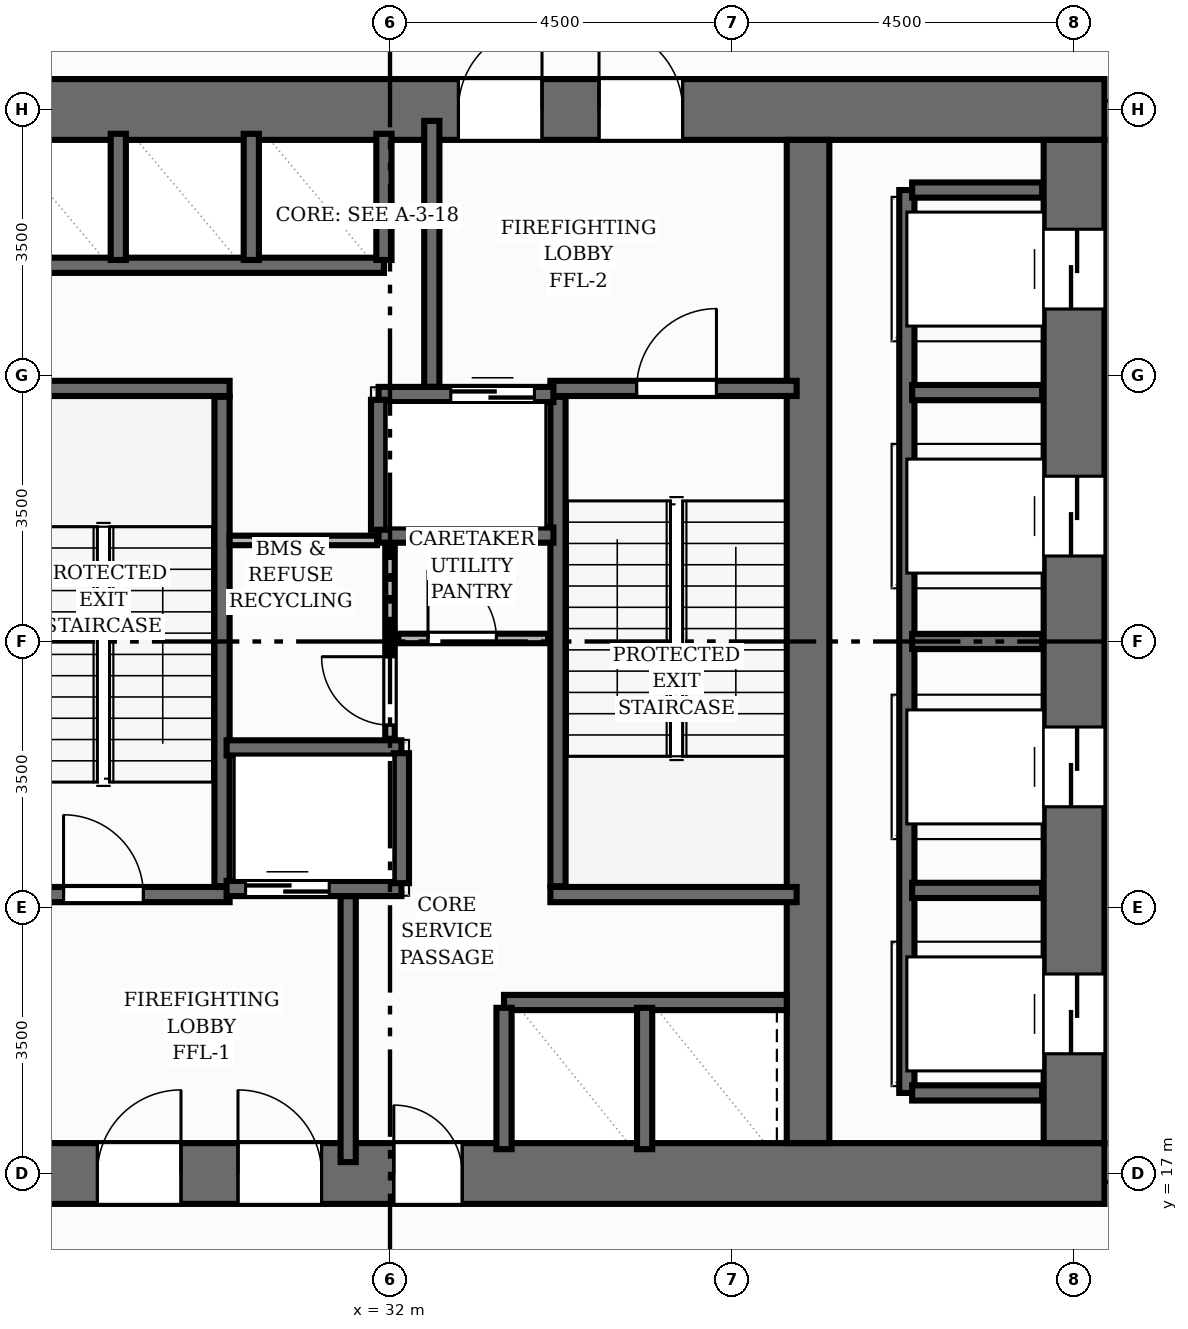
"""IFC4 building model, lengths in metres.
Left out: names, types, materials, properties, quantities, classifications, styles, units other than length and angle.
Written with IfcOpenShell. Run it as: python <this file> out.ifc"""

import sys

from ifc_helpers import new_model, si_unit, direction, frame, frame_2d, origin, place, context, subcontext, project, spatial, rectangle, extrude, element, fill, save


model = new_model("IFC4")
c1 = context("Model", 3, precision=1e-05, world=origin(), true_north=direction((0.0, 1.0)))
c2 = subcontext(c1, "Body", "Model", "MODEL_VIEW")
j1 = project(units=[si_unit("LENGTHUNIT", "METRE"), si_unit("PLANEANGLEUNIT", "RADIAN")], contexts=[c1])
p1 = place(None, origin())
s1 = spatial("IfcSite", under=j1, at=p1, CompositionType="ELEMENT")
p2 = place(p1, origin())
s2 = spatial("IfcBuilding", under=s1, at=p2, CompositionType="ELEMENT")
p3 = place(p2, frame((0.0, 0.0, 66.4)))
s3 = spatial("IfcBuildingStorey", under=s2, at=p3, CompositionType="ELEMENT", Elevation=66.4)
p4 = place(p3, frame((22.6, 17.0, 0.0), z_axis=(0.0, 0.0, 1.0), x_axis=(1.0, 0.0, 0.0)))
e1 = element("IfcWall", 1, at=p4, inside=s3, PredefinedType="SHEAR", context=c2, shape_type="SweptSolid", body=[
    extrude(rectangle(XDim=18.8, YDim=0.8, at=frame_2d((9.4, 0.0))), origin(), (0.0, 0.0, 1.0), 4.48),
])
p5 = place(p4, frame((5.55, 0.0, 0.0)))
e2 = element("IfcOpeningElement", 2, at=p5, cuts=e1, PredefinedType="OPENING", context=c2, shape_type="SweptSolid", body=[
    extrude(rectangle(XDim=1.1, YDim=2.15, at=frame_2d((0.55, 1.075))), frame((0.0, 0.41, 0.0), z_axis=(0.0, -1.0, 0.0), x_axis=(1.0, 0.0, 0.0)), (0.0, 0.0, 1.0), 0.82),
])
p6 = place(p4, frame((7.4, 0.0, 0.0)))
e3 = element("IfcOpeningElement", 3, at=p6, cuts=e1, PredefinedType="OPENING", context=c2, shape_type="SweptSolid", body=[
    extrude(rectangle(XDim=1.1, YDim=2.15, at=frame_2d((0.55, 1.075))), frame((0.0, 0.41, 0.0), z_axis=(0.0, -1.0, 0.0), x_axis=(1.0, 0.0, 0.0)), (0.0, 0.0, 1.0), 0.82),
])
p7 = place(p4, frame((9.45, 0.0, 0.0)))
e4 = element("IfcOpeningElement", 4, at=p7, cuts=e1, PredefinedType="OPENING", context=c2, shape_type="SweptSolid", body=[
    extrude(rectangle(XDim=0.9, YDim=2.1, at=frame_2d((0.45, 1.05))), frame((0.0, 0.41, 0.0), z_axis=(0.0, -1.0, 0.0), x_axis=(1.0, 0.0, 0.0)), (0.0, 0.0, 1.0), 0.82),
])
p8 = place(p3, frame((22.6, 31.0, 0.0), z_axis=(0.0, 0.0, 1.0), x_axis=(1.0, 0.0, 0.0)))
e5 = element("IfcWall", 5, at=p8, inside=s3, PredefinedType="SHEAR", context=c2, shape_type="SweptSolid", body=[
    extrude(rectangle(XDim=18.8, YDim=0.8, at=frame_2d((9.4, 0.0))), origin(), (0.0, 0.0, 1.0), 4.48),
])
p9 = place(p8, frame((10.3, 0.0, 0.0)))
e6 = element("IfcOpeningElement", 6, at=p9, cuts=e5, PredefinedType="OPENING", context=c2, shape_type="SweptSolid", body=[
    extrude(rectangle(XDim=1.1, YDim=2.15, at=frame_2d((0.55, 1.075))), frame((0.0, 0.41, 0.0), z_axis=(0.0, -1.0, 0.0), x_axis=(1.0, 0.0, 0.0)), (0.0, 0.0, 1.0), 0.82),
])
p10 = place(p8, frame((12.15, 0.0, 0.0)))
e7 = element("IfcOpeningElement", 7, at=p10, cuts=e5, PredefinedType="OPENING", context=c2, shape_type="SweptSolid", body=[
    extrude(rectangle(XDim=1.1, YDim=2.15, at=frame_2d((0.55, 1.075))), frame((0.0, 0.41, 0.0), z_axis=(0.0, -1.0, 0.0), x_axis=(1.0, 0.0, 0.0)), (0.0, 0.0, 1.0), 0.82),
])
p11 = place(p3, frame((41.0, 17.4, 0.0), z_axis=(0.0, 0.0, 1.0), x_axis=(0.0, 1.0, 0.0)))
e8 = element("IfcWall", 8, at=p11, inside=s3, PredefinedType="SHEAR", context=c2, shape_type="SweptSolid", body=[
    extrude(rectangle(XDim=13.2, YDim=0.8, at=frame_2d((6.6, 0.0))), origin(), (0.0, 0.0, 1.0), 4.48),
])
p12 = place(p11, frame((1.175, 0.0, 0.0)))
e9 = element("IfcOpeningElement", 9, at=p12, cuts=e8, PredefinedType="OPENING", context=c2, shape_type="SweptSolid", body=[
    extrude(rectangle(XDim=1.05, YDim=2.15, at=frame_2d((0.525, 1.075))), frame((0.0, 0.41, 0.0), z_axis=(0.0, -1.0, 0.0), x_axis=(1.0, 0.0, 0.0)), (0.0, 0.0, 1.0), 0.82),
])
p13 = place(p11, frame((4.425, 0.0, 0.0)))
e10 = element("IfcOpeningElement", 10, at=p13, cuts=e8, PredefinedType="OPENING", context=c2, shape_type="SweptSolid", body=[
    extrude(rectangle(XDim=1.05, YDim=2.15, at=frame_2d((0.525, 1.075))), frame((0.0, 0.41, 0.0), z_axis=(0.0, -1.0, 0.0), x_axis=(1.0, 0.0, 0.0)), (0.0, 0.0, 1.0), 0.82),
])
p14 = place(p11, frame((7.725, 0.0, 0.0)))
e11 = element("IfcOpeningElement", 11, at=p14, cuts=e8, PredefinedType="OPENING", context=c2, shape_type="SweptSolid", body=[
    extrude(rectangle(XDim=1.05, YDim=2.15, at=frame_2d((0.525, 1.075))), frame((0.0, 0.41, 0.0), z_axis=(0.0, -1.0, 0.0), x_axis=(1.0, 0.0, 0.0)), (0.0, 0.0, 1.0), 0.82),
])
p15 = place(p11, frame((10.975, 0.0, 0.0)))
e12 = element("IfcOpeningElement", 12, at=p15, cuts=e8, PredefinedType="OPENING", context=c2, shape_type="SweptSolid", body=[
    extrude(rectangle(XDim=1.05, YDim=2.15, at=frame_2d((0.525, 1.075))), frame((0.0, 0.41, 0.0), z_axis=(0.0, -1.0, 0.0), x_axis=(1.0, 0.0, 0.0)), (0.0, 0.0, 1.0), 0.82),
])
p16 = place(p3, frame((37.5, 17.4, 0.0), z_axis=(0.0, 0.0, 1.0), x_axis=(0.0, 1.0, 0.0)))
e13 = element("IfcWall", 13, at=p16, inside=s3, PredefinedType="SHEAR", context=c2, shape_type="SweptSolid", body=[
    extrude(rectangle(XDim=13.2, YDim=0.56, at=frame_2d((6.6, 0.0))), origin(), (0.0, 0.0, 1.0), 4.48),
])
p17 = place(p3, frame((29.79, 20.78, 0.0), z_axis=(0.0, 0.0, 1.0), x_axis=(0.0, 1.0, 0.0)))
e14 = element("IfcWall", 14, at=p17, inside=s3, PredefinedType="SHEAR", context=c2, shape_type="SweptSolid", body=[
    extrude(rectangle(XDim=6.44, YDim=0.2, at=frame_2d((3.22, 0.0))), origin(), (0.0, 0.0, 1.0), 4.48),
])
p18 = place(p3, frame((26.65, 27.33, 0.0), z_axis=(0.0, 0.0, 1.0), x_axis=(1.0, 0.0, 0.0)))
e15 = element("IfcWall", 15, at=p18, inside=s3, PredefinedType="SHEAR", context=c2, shape_type="SweptSolid", body=[
    extrude(rectangle(XDim=3.24, YDim=0.2, at=frame_2d((1.62, 0.0))), origin(), (0.0, 0.0, 1.0), 4.48),
])
p19 = place(p3, frame((26.65, 20.67, 0.0), z_axis=(0.0, 0.0, 1.0), x_axis=(1.0, 0.0, 0.0)))
e16 = element("IfcWall", 16, at=p19, inside=s3, PredefinedType="SHEAR", context=c2, shape_type="SweptSolid", body=[
    extrude(rectangle(XDim=3.24, YDim=0.2, at=frame_2d((1.62, 0.0))), origin(), (0.0, 0.0, 1.0), 4.48),
])
p20 = place(p19, frame((1.055, 0.0, 0.0)))
e17 = element("IfcOpeningElement", 17, at=p20, cuts=e16, PredefinedType="OPENING", context=c2, shape_type="SweptSolid", body=[
    extrude(rectangle(XDim=1.05, YDim=2.15, at=frame_2d((0.525, 1.075))), frame((0.0, 0.11, 0.0), z_axis=(0.0, -1.0, 0.0), x_axis=(1.0, 0.0, 0.0)), (0.0, 0.0, 1.0), 0.22),
])
p21 = place(p3, frame((34.21, 20.78, 0.0), z_axis=(0.0, 0.0, 1.0), x_axis=(0.0, 1.0, 0.0)))
e18 = element("IfcWall", 18, at=p21, inside=s3, PredefinedType="SHEAR", context=c2, shape_type="SweptSolid", body=[
    extrude(rectangle(XDim=6.44, YDim=0.2, at=frame_2d((3.22, 0.0))), origin(), (0.0, 0.0, 1.0), 4.48),
])
p22 = place(p3, frame((34.11, 20.67, 0.0), z_axis=(0.0, 0.0, 1.0), x_axis=(1.0, 0.0, 0.0)))
e19 = element("IfcWall", 19, at=p22, inside=s3, PredefinedType="SHEAR", context=c2, shape_type="SweptSolid", body=[
    extrude(rectangle(XDim=3.24, YDim=0.2, at=frame_2d((1.62, 0.0))), origin(), (0.0, 0.0, 1.0), 4.48),
])
p23 = place(p3, frame((34.11, 27.33, 0.0), z_axis=(0.0, 0.0, 1.0), x_axis=(1.0, 0.0, 0.0)))
e20 = element("IfcWall", 20, at=p23, inside=s3, PredefinedType="SHEAR", context=c2, shape_type="SweptSolid", body=[
    extrude(rectangle(XDim=3.24, YDim=0.2, at=frame_2d((1.62, 0.0))), origin(), (0.0, 0.0, 1.0), 4.48),
])
p24 = place(p23, frame((1.135, 0.0, 0.0)))
e21 = element("IfcOpeningElement", 21, at=p24, cuts=e20, PredefinedType="OPENING", context=c2, shape_type="SweptSolid", body=[
    extrude(rectangle(XDim=1.05, YDim=2.15, at=frame_2d((0.525, 1.075))), frame((0.0, 0.11, 0.0), z_axis=(0.0, -1.0, 0.0), x_axis=(1.0, 0.0, 0.0)), (0.0, 0.0, 1.0), 0.22),
])
for number, where, z_axis, x_axis in (
    (22, (31.45, 17.15, 0.0), (0.0, 0.0, 1.0), (0.0, 1.0, 0.0)),
    (23, (32.55, 27.35, 0.0), (0.0, 0.0, 1.0), (0.0, 1.0, 0.0)),
):
    element("IfcWall", number, at=place(p3, frame(where, z_axis=z_axis, x_axis=x_axis)), inside=s3, PredefinedType="SHEAR", context=c2, shape_type="SweptSolid", body=[
        extrude(rectangle(XDim=3.5, YDim=0.2, at=frame_2d((1.75, 0.0))), origin(), (0.0, 0.0, 1.0), 4.48),
    ])
p25 = place(p3, frame((29.85, 20.75, 0.0), z_axis=(0.0, 0.0, 1.0), x_axis=(1.0, 0.0, 0.0)))
e24 = element("IfcWall", 24, at=p25, inside=s3, PredefinedType="SHEAR", context=c2, shape_type="SweptSolid", body=[
    extrude(rectangle(XDim=2.3, YDim=0.2, at=frame_2d((1.15, 0.0))), origin(), (0.0, 0.0, 1.0), 4.48),
])
p26 = place(p25, frame((0.25, 0.0, 0.0)))
e25 = element("IfcOpeningElement", 25, at=p26, cuts=e24, PredefinedType="OPENING", context=c2, shape_type="SweptSolid", body=[
    extrude(rectangle(XDim=1.1, YDim=2.15, at=frame_2d((0.55, 1.075))), frame((0.0, 0.11, 0.0), z_axis=(0.0, -1.0, 0.0), x_axis=(1.0, 0.0, 0.0)), (0.0, 0.0, 1.0), 0.22),
])
p27 = place(p3, frame((29.85, 22.6, 0.0), z_axis=(0.0, 0.0, 1.0), x_axis=(1.0, 0.0, 0.0)))
e26 = element("IfcWall", 26, at=p27, inside=s3, PredefinedType="SHEAR", context=c2, shape_type="SweptSolid", body=[
    extrude(rectangle(XDim=2.3, YDim=0.2, at=frame_2d((1.15, 0.0))), origin(), (0.0, 0.0, 1.0), 4.48),
])
p28 = place(p3, frame((32.15, 20.82, 0.0), z_axis=(0.0, 0.0, 1.0), x_axis=(0.0, 1.0, 0.0)))
e27 = element("IfcWall", 27, at=p28, inside=s3, PredefinedType="SHEAR", context=c2, shape_type="SweptSolid", body=[
    extrude(rectangle(XDim=1.71, YDim=0.2, at=frame_2d((0.855, 0.0))), origin(), (0.0, 0.0, 1.0), 4.48),
])
p29 = place(p3, frame((31.85, 27.25, 0.0), z_axis=(0.0, 0.0, 1.0), x_axis=(1.0, 0.0, 0.0)))
e28 = element("IfcWall", 28, at=p29, inside=s3, PredefinedType="SHEAR", context=c2, shape_type="SweptSolid", body=[
    extrude(rectangle(XDim=2.3, YDim=0.2, at=frame_2d((1.15, 0.0))), origin(), (0.0, 0.0, 1.0), 4.48),
])
p30 = place(p29, frame((0.95, 0.0, 0.0)))
e29 = element("IfcOpeningElement", 29, at=p30, cuts=e28, PredefinedType="OPENING", context=c2, shape_type="SweptSolid", body=[
    extrude(rectangle(XDim=1.1, YDim=2.15, at=frame_2d((0.55, 1.075))), frame((0.0, 0.11, 0.0), z_axis=(0.0, -1.0, 0.0), x_axis=(1.0, 0.0, 0.0)), (0.0, 0.0, 1.0), 0.22),
])
p31 = place(p3, frame((31.85, 25.4, 0.0), z_axis=(0.0, 0.0, 1.0), x_axis=(1.0, 0.0, 0.0)))
e30 = element("IfcWall", 30, at=p31, inside=s3, PredefinedType="SHEAR", context=c2, shape_type="SweptSolid", body=[
    extrude(rectangle(XDim=2.3, YDim=0.2, at=frame_2d((1.15, 0.0))), origin(), (0.0, 0.0, 1.0), 4.48),
])
p32 = place(p3, frame((31.85, 25.47, 0.0), z_axis=(0.0, 0.0, 1.0), x_axis=(0.0, 1.0, 0.0)))
e31 = element("IfcWall", 31, at=p32, inside=s3, PredefinedType="SHEAR", context=c2, shape_type="SweptSolid", body=[
    extrude(rectangle(XDim=1.71, YDim=0.2, at=frame_2d((0.855, 0.0))), origin(), (0.0, 0.0, 1.0), 4.48),
])
p33 = place(p3, frame((38.8, 18.06, 0.0), z_axis=(0.0, 0.0, 1.0), x_axis=(0.0, 1.0, 0.0)))
e32 = element("IfcWall", 32, at=p33, inside=s3, PredefinedType="SHEAR", context=c2, shape_type="SweptSolid", body=[
    extrude(rectangle(XDim=11.88, YDim=0.2, at=frame_2d((5.94, 0.0))), origin(), (0.0, 0.0, 1.0), 4.48),
])
for number, where, z_axis, x_axis in (
    (33, (38.87, 18.06, 0.0), (0.0, 0.0, 1.0), (1.0, 0.0, 0.0)),
    (34, (38.87, 29.94, 0.0), (0.0, 0.0, 1.0), (1.0, 0.0, 0.0)),
    (35, (38.87, 20.725, 0.0), (0.0, 0.0, 1.0), (1.0, 0.0, 0.0)),
    (36, (38.87, 24.0, 0.0), (0.0, 0.0, 1.0), (1.0, 0.0, 0.0)),
    (37, (38.87, 27.275, 0.0), (0.0, 0.0, 1.0), (1.0, 0.0, 0.0)),
):
    element("IfcWall", number, at=place(p3, frame(where, z_axis=z_axis, x_axis=x_axis)), inside=s3, PredefinedType="SHEAR", context=c2, shape_type="SweptSolid", body=[
        extrude(rectangle(XDim=1.71, YDim=0.2, at=frame_2d((0.855, 0.0))), origin(), (0.0, 0.0, 1.0), 4.48),
    ])
p34 = place(p3, frame((26.68, 28.95, 0.0), z_axis=(0.0, 0.0, 1.0), x_axis=(1.0, 0.0, 0.0)))
e38 = element("IfcWall", 38, at=p34, inside=s3, PredefinedType="SHEAR", context=c2, shape_type="SweptSolid", body=[
    extrude(rectangle(XDim=5.24, YDim=0.2, at=frame_2d((2.62, 0.0))), origin(), (0.0, 0.0, 1.0), 4.48),
])
for number, where, z_axis, x_axis in (
    (39, (31.92, 29.02, 0.0), (0.0, 0.0, 1.0), (0.0, 1.0, 0.0)),
    (40, (28.425, 29.02, 0.0), (0.0, 0.0, 1.0), (0.0, 1.0, 0.0)),
    (41, (30.175, 29.02, 0.0), (0.0, 0.0, 1.0), (0.0, 1.0, 0.0)),
):
    element("IfcWall", number, at=place(p3, frame(where, z_axis=z_axis, x_axis=x_axis)), inside=s3, PredefinedType="SHEAR", context=c2, shape_type="SweptSolid", body=[
        extrude(rectangle(XDim=1.66, YDim=0.2, at=frame_2d((0.83, 0.0))), origin(), (0.0, 0.0, 1.0), 4.48),
    ])
p35 = place(p3, frame((33.5, 19.25, 0.0), z_axis=(0.0, 0.0, 1.0), x_axis=(1.0, 0.0, 0.0)))
e42 = element("IfcWall", 42, at=p35, inside=s3, PredefinedType="SHEAR", context=c2, shape_type="SweptSolid", body=[
    extrude(rectangle(XDim=3.72, YDim=0.2, at=frame_2d((1.86, 0.0))), origin(), (0.0, 0.0, 1.0), 4.48),
])
for number, where, z_axis, x_axis in (
    (43, (33.5, 17.32, 0.0), (0.0, 0.0, 1.0), (0.0, 1.0, 0.0)),
    (44, (35.35, 17.32, 0.0), (0.0, 0.0, 1.0), (0.0, 1.0, 0.0)),
):
    element("IfcWall", number, at=place(p3, frame(where, z_axis=z_axis, x_axis=x_axis)), inside=s3, PredefinedType="SHEAR", context=c2, shape_type="SweptSolid", body=[
        extrude(rectangle(XDim=1.86, YDim=0.2, at=frame_2d((0.93, 0.0))), origin(), (0.0, 0.0, 1.0), 4.48),
    ])
p36 = place(p3, frame((32.0, 22.72, 0.0), z_axis=(0.0, 0.0, 1.0), x_axis=(0.0, 1.0, 0.0)))
e45 = element("IfcWall", 45, at=p36, inside=s3, PredefinedType="PARTITIONING", context=c2, shape_type="SweptSolid", body=[
    extrude(rectangle(XDim=2.52, YDim=0.125, at=frame_2d((1.26, 0.0))), origin(), (0.0, 0.0, 1.0), 4.235),
])
p37 = place(p36, frame((0.18, 0.0, 0.0)))
e46 = element("IfcOpeningElement", 46, at=p37, cuts=e45, PredefinedType="OPENING", context=c2, shape_type="SweptSolid", body=[
    extrude(rectangle(XDim=0.9, YDim=2.1, at=frame_2d((0.45, 1.05))), frame((0.0, 0.073, 0.0), z_axis=(0.0, -1.0, 0.0), x_axis=(1.0, 0.0, 0.0)), (0.0, 0.0, 1.0), 0.145),
])
p38 = place(p3, frame((32.11, 24.04, 0.0), z_axis=(0.0, 0.0, 1.0), x_axis=(1.0, 0.0, 0.0)))
e47 = element("IfcWall", 47, at=p38, inside=s3, PredefinedType="PARTITIONING", context=c2, shape_type="SweptSolid", body=[
    extrude(rectangle(XDim=1.97, YDim=0.125, at=frame_2d((0.985, 0.0))), origin(), (0.0, 0.0, 1.0), 4.235),
])
p39 = place(p38, frame((0.39, 0.0, 0.0)))
e48 = element("IfcOpeningElement", 48, at=p39, cuts=e47, PredefinedType="OPENING", context=c2, shape_type="SweptSolid", body=[
    extrude(rectangle(XDim=0.9, YDim=2.1, at=frame_2d((0.45, 1.05))), frame((0.0, 0.073, 0.0), z_axis=(0.0, -1.0, 0.0), x_axis=(1.0, 0.0, 0.0)), (0.0, 0.0, 1.0), 0.145),
])
p40 = place(p3, frame((29.89, 25.33, 0.0), z_axis=(0.0, 0.0, 1.0), x_axis=(1.0, 0.0, 0.0)))
e49 = element("IfcWall", 49, at=p40, inside=s3, PredefinedType="PARTITIONING", context=c2, shape_type="SweptSolid", body=[
    extrude(rectangle(XDim=1.94, YDim=0.125, at=frame_2d((0.97, 0.0))), origin(), (0.0, 0.0, 1.0), 4.235),
])
p41 = place(p20, origin())
e50 = element("IfcDoor", 50, at=p41, inside=s3, OperationType="SINGLE_SWING_LEFT", PredefinedType="DOOR", context=c2, shape_type="SweptSolid", body=[
    extrude(rectangle(XDim=1.05, YDim=2.15, at=frame_2d((0.525, 1.075))), frame((0.0, 0.025, 0.0), z_axis=(0.0, -1.0, 0.0), x_axis=(1.0, 0.0, 0.0)), (0.0, 0.0, 1.0), 0.05),
])
fill(e17, e50)
p42 = place(p24, origin())
e51 = element("IfcDoor", 51, at=p42, inside=s3, OperationType="SINGLE_SWING_RIGHT", PredefinedType="DOOR", context=c2, shape_type="SweptSolid", body=[
    extrude(rectangle(XDim=1.05, YDim=2.15, at=frame_2d((0.525, 1.075))), frame((0.0, 0.025, 0.0), z_axis=(0.0, -1.0, 0.0), x_axis=(1.0, 0.0, 0.0)), (0.0, 0.0, 1.0), 0.05),
])
fill(e21, e51)
p43 = place(p5, origin())
e52 = element("IfcDoor", 52, at=p43, inside=s3, OperationType="SINGLE_SWING_RIGHT", PredefinedType="DOOR", context=c2, shape_type="SweptSolid", body=[
    extrude(rectangle(XDim=1.1, YDim=2.15, at=frame_2d((0.55, 1.075))), frame((0.0, 0.025, 0.0), z_axis=(0.0, -1.0, 0.0), x_axis=(1.0, 0.0, 0.0)), (0.0, 0.0, 1.0), 0.05),
])
fill(e2, e52)
p44 = place(p6, origin())
e53 = element("IfcDoor", 53, at=p44, inside=s3, OperationType="SINGLE_SWING_LEFT", PredefinedType="DOOR", context=c2, shape_type="SweptSolid", body=[
    extrude(rectangle(XDim=1.1, YDim=2.15, at=frame_2d((0.55, 1.075))), frame((0.0, 0.025, 0.0), z_axis=(0.0, -1.0, 0.0), x_axis=(1.0, 0.0, 0.0)), (0.0, 0.0, 1.0), 0.05),
])
fill(e3, e53)
p45 = place(p9, origin())
e54 = element("IfcDoor", 54, at=p45, inside=s3, OperationType="SINGLE_SWING_RIGHT", PredefinedType="DOOR", context=c2, shape_type="SweptSolid", body=[
    extrude(rectangle(XDim=1.1, YDim=2.15, at=frame_2d((0.55, 1.075))), frame((0.0, 0.025, 0.0), z_axis=(0.0, -1.0, 0.0), x_axis=(1.0, 0.0, 0.0)), (0.0, 0.0, 1.0), 0.05),
])
fill(e6, e54)
p46 = place(p10, origin())
e55 = element("IfcDoor", 55, at=p46, inside=s3, OperationType="SINGLE_SWING_LEFT", PredefinedType="DOOR", context=c2, shape_type="SweptSolid", body=[
    extrude(rectangle(XDim=1.1, YDim=2.15, at=frame_2d((0.55, 1.075))), frame((0.0, 0.025, 0.0), z_axis=(0.0, -1.0, 0.0), x_axis=(1.0, 0.0, 0.0)), (0.0, 0.0, 1.0), 0.05),
])
fill(e7, e55)
p47 = place(p26, origin())
e56 = element("IfcDoor", 56, at=p47, inside=s3, OperationType="DOUBLE_DOOR_SLIDING", PredefinedType="DOOR", context=c2, shape_type="SweptSolid", body=[
    extrude(rectangle(XDim=1.1, YDim=2.15, at=frame_2d((0.55, 1.075))), frame((0.0, 0.025, 0.0), z_axis=(0.0, -1.0, 0.0), x_axis=(1.0, 0.0, 0.0)), (0.0, 0.0, 1.0), 0.05),
])
fill(e25, e56)
p48 = place(p30, origin())
e57 = element("IfcDoor", 57, at=p48, inside=s3, OperationType="DOUBLE_DOOR_SLIDING", PredefinedType="DOOR", context=c2, shape_type="SweptSolid", body=[
    extrude(rectangle(XDim=1.1, YDim=2.15, at=frame_2d((0.55, 1.075))), frame((0.0, 0.025, 0.0), z_axis=(0.0, -1.0, 0.0), x_axis=(1.0, 0.0, 0.0)), (0.0, 0.0, 1.0), 0.05),
])
fill(e29, e57)
p49 = place(p12, origin())
e58 = element("IfcDoor", 58, at=p49, inside=s3, OperationType="DOUBLE_DOOR_SLIDING", PredefinedType="DOOR", context=c2, shape_type="SweptSolid", body=[
    extrude(rectangle(XDim=1.05, YDim=2.15, at=frame_2d((0.525, 1.075))), frame((0.0, 0.025, 0.0), z_axis=(0.0, -1.0, 0.0), x_axis=(1.0, 0.0, 0.0)), (0.0, 0.0, 1.0), 0.05),
])
fill(e9, e58)
p50 = place(p13, origin())
e59 = element("IfcDoor", 59, at=p50, inside=s3, OperationType="DOUBLE_DOOR_SLIDING", PredefinedType="DOOR", context=c2, shape_type="SweptSolid", body=[
    extrude(rectangle(XDim=1.05, YDim=2.15, at=frame_2d((0.525, 1.075))), frame((0.0, 0.025, 0.0), z_axis=(0.0, -1.0, 0.0), x_axis=(1.0, 0.0, 0.0)), (0.0, 0.0, 1.0), 0.05),
])
fill(e10, e59)
p51 = place(p14, origin())
e60 = element("IfcDoor", 60, at=p51, inside=s3, OperationType="DOUBLE_DOOR_SLIDING", PredefinedType="DOOR", context=c2, shape_type="SweptSolid", body=[
    extrude(rectangle(XDim=1.05, YDim=2.15, at=frame_2d((0.525, 1.075))), frame((0.0, 0.025, 0.0), z_axis=(0.0, -1.0, 0.0), x_axis=(1.0, 0.0, 0.0)), (0.0, 0.0, 1.0), 0.05),
])
fill(e11, e60)
p52 = place(p15, origin())
e61 = element("IfcDoor", 61, at=p52, inside=s3, OperationType="DOUBLE_DOOR_SLIDING", PredefinedType="DOOR", context=c2, shape_type="SweptSolid", body=[
    extrude(rectangle(XDim=1.05, YDim=2.15, at=frame_2d((0.525, 1.075))), frame((0.0, 0.025, 0.0), z_axis=(0.0, -1.0, 0.0), x_axis=(1.0, 0.0, 0.0)), (0.0, 0.0, 1.0), 0.05),
])
fill(e12, e61)
p53 = place(p7, origin())
e62 = element("IfcDoor", 62, at=p53, inside=s3, OperationType="SINGLE_SWING_LEFT", PredefinedType="DOOR", context=c2, shape_type="SweptSolid", body=[
    extrude(rectangle(XDim=0.9, YDim=2.1, at=frame_2d((0.45, 1.05))), frame((0.0, 0.025, 0.0), z_axis=(0.0, -1.0, 0.0), x_axis=(1.0, 0.0, 0.0)), (0.0, 0.0, 1.0), 0.05),
])
fill(e4, e62)
p54 = place(p39, origin())
e63 = element("IfcDoor", 63, at=p54, inside=s3, OperationType="SINGLE_SWING_LEFT", PredefinedType="DOOR", context=c2, shape_type="SweptSolid", body=[
    extrude(rectangle(XDim=0.9, YDim=2.1, at=frame_2d((0.45, 1.05))), frame((0.0, 0.025, 0.0), z_axis=(0.0, -1.0, 0.0), x_axis=(1.0, 0.0, 0.0)), (0.0, 0.0, 1.0), 0.05),
])
fill(e48, e63)
p55 = place(p37, origin())
e64 = element("IfcDoor", 64, at=p55, inside=s3, OperationType="SINGLE_SWING_RIGHT", PredefinedType="DOOR", context=c2, shape_type="SweptSolid", body=[
    extrude(rectangle(XDim=0.9, YDim=2.1, at=frame_2d((0.45, 1.05))), frame((0.0, 0.025, 0.0), z_axis=(0.0, -1.0, 0.0), x_axis=(1.0, 0.0, 0.0)), (0.0, 0.0, 1.0), 0.05),
])
fill(e46, e64)
save(model, sys.argv[1])
